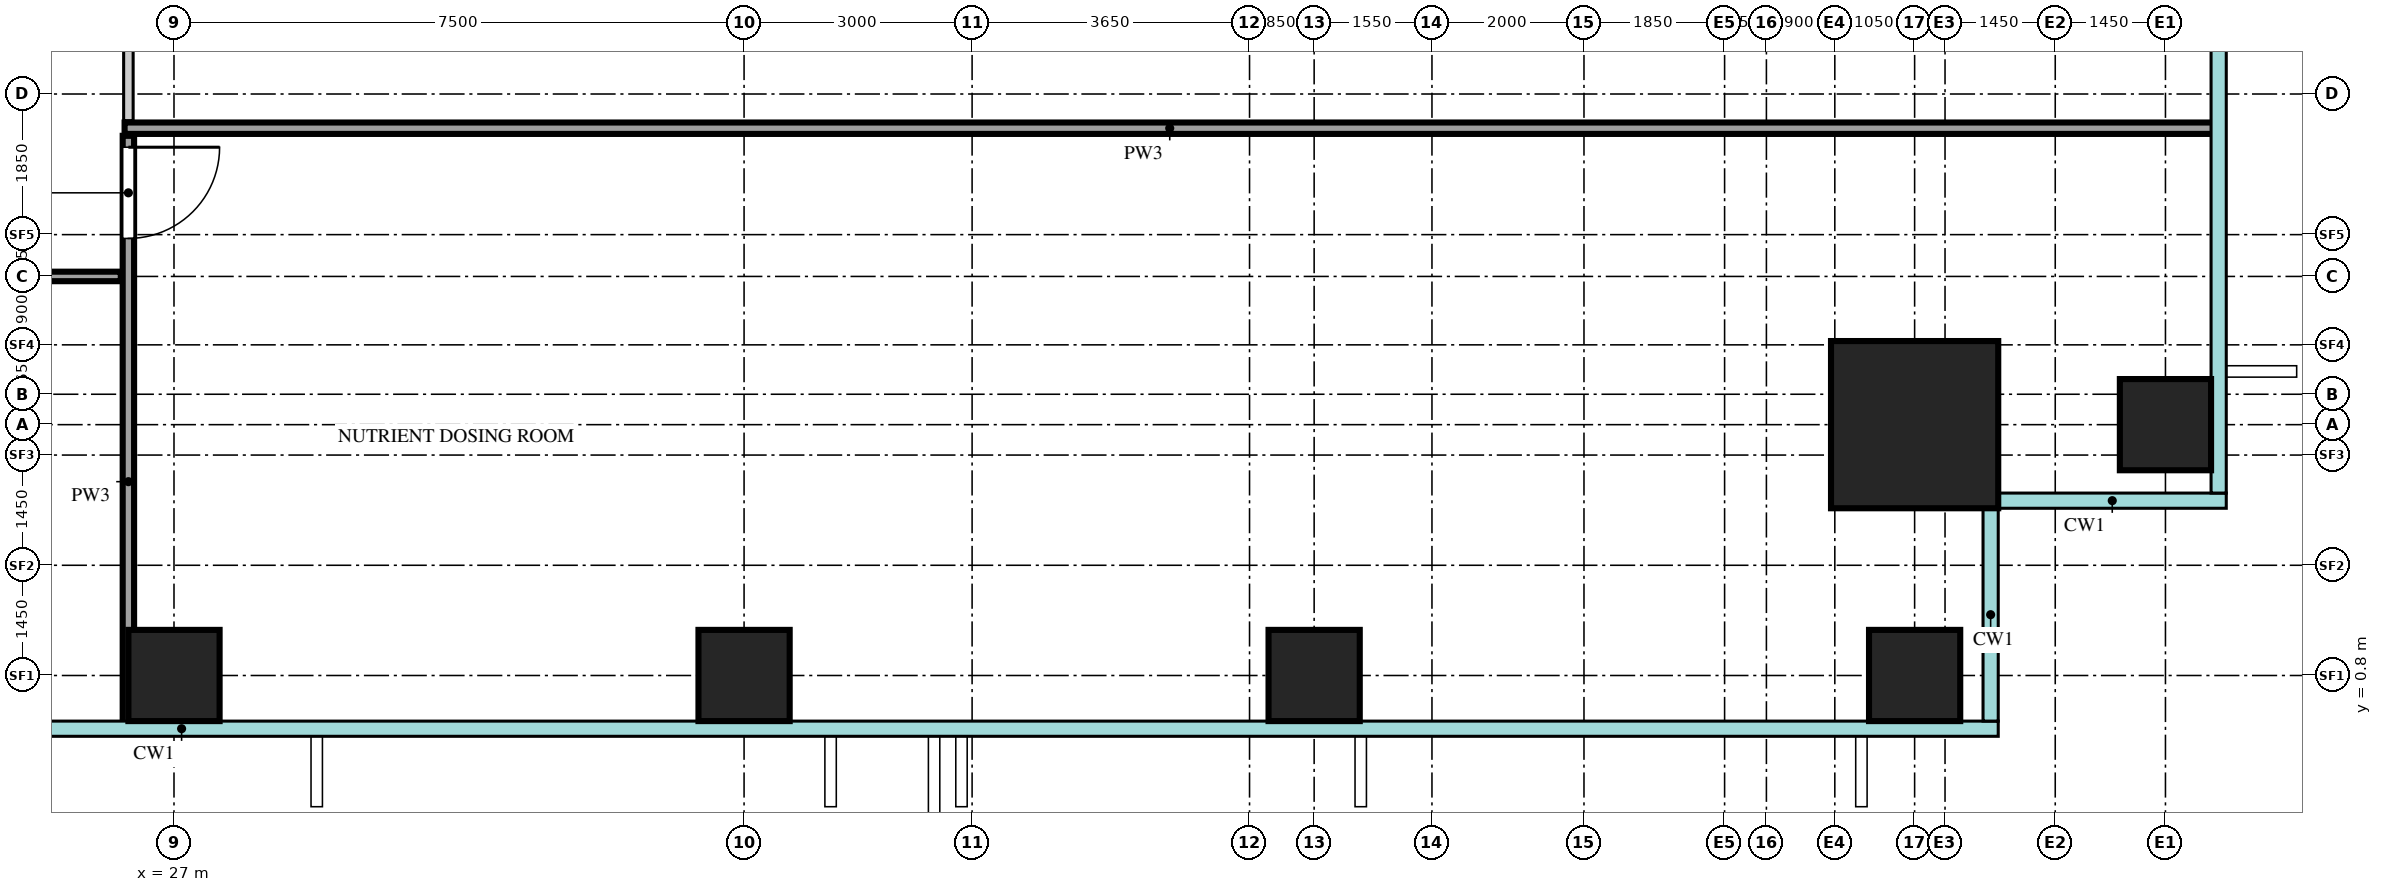
"""IFC4 building model, lengths in metres.
Left out: names, types, materials, properties, quantities, classifications, styles, units other than length and angle.
Written with IfcOpenShell. Run it as: python <this file> out.ifc"""

import sys

from ifc_helpers import new_model, si_unit, direction, frame, frame_2d, origin, origin_2d, place, context, subcontext, project, spatial, rectangle, extrude, source, transform, mapped, element, fill, save


model = new_model("IFC4")
c1 = context("Model", 3, precision=1e-05, world=origin(), true_north=direction((0.0, 1.0)))
c2 = subcontext(c1, "Body", "Model", "MODEL_VIEW")
j1 = project(units=[si_unit("LENGTHUNIT", "METRE"), si_unit("PLANEANGLEUNIT", "RADIAN")], contexts=[c1])
p1 = place(None, origin())
s1 = spatial("IfcSite", under=j1, at=p1, CompositionType="ELEMENT")
p2 = place(p1, origin())
s2 = spatial("IfcBuilding", under=s1, at=p2, CompositionType="ELEMENT")
p3 = place(p2, frame((0.0, 0.0, 33.0)))
s3 = spatial("IfcBuildingStorey", under=s2, at=p3, CompositionType="ELEMENT", Elevation=33.0)
m1 = source(origin(), c2, "Body", "SweptSolid", [
    extrude(rectangle(XDim=2.2, YDim=2.2, at=origin_2d()), origin(), (0.0, 0.0, 1.0), 4.5),
])
p4 = place(p3, frame((49.9, 4.1, 0.0), z_axis=(0.0, 0.0, 1.0), x_axis=(1.0, 0.0, 0.0)))
e1 = element("IfcColumn", 1, at=p4, inside=s3, PredefinedType="COLUMN", context=c2, shape_type="MappedRepresentation", body=[
    mapped(m1, transform((0.0, 0.0, 0.0))),
])
m2 = source(origin(), c2, "Body", "SweptSolid", [
    extrude(rectangle(XDim=1.2, YDim=1.2, at=origin_2d()), origin(), (0.0, 0.0, 1.0), 4.2),
])
for number, where, z_axis, x_axis in (
    (2, (27.0, 0.8, 0.0), (0.0, 0.0, 1.0), (1.0, 0.0, 0.0)),
    (3, (34.5, 0.8, 0.0), (0.0, 0.0, 1.0), (1.0, 0.0, 0.0)),
    (4, (42.0, 0.8, 0.0), (0.0, 0.0, 1.0), (1.0, 0.0, 0.0)),
    (5, (49.9, 0.8, 0.0), (0.0, 0.0, 1.0), (1.0, 0.0, 0.0)),
    (6, (53.2, 4.1, 0.0), (0.0, 0.0, 1.0), (1.0, 0.0, 0.0)),
):
    element("IfcColumn", number, at=place(p3, frame(where, z_axis=z_axis, x_axis=x_axis)), inside=s3, PredefinedType="COLUMN", context=c2, shape_type="MappedRepresentation", body=[
        mapped(m2, transform((0.0, 0.0, 0.0))),
    ])
m3 = source(origin(), c2, "Body", "SweptSolid", [
    extrude(rectangle(XDim=7.75, YDim=0.15, at=frame_2d((3.875, 0.0))), origin(), (0.0, 0.0, 1.0), 4.3),
])
p5 = place(p3, frame((26.4, 0.15, 0.0), z_axis=(0.0, 0.0, 1.0), x_axis=(0.0, 1.0, 0.0)))
e7 = element("IfcWall", 7, at=p5, inside=s3, PredefinedType="PARTITIONING", context=c2, shape_type="MappedRepresentation", body=[
    mapped(m3, transform((0.0, 0.0, 0.0))),
])
m4 = source(origin(), c2, "Body", "SweptSolid", [
    extrude(rectangle(XDim=1.2, YDim=2.1, at=frame_2d((0.6, 1.05))), frame((0.0, 0.085, 0.0), z_axis=(0.0, -1.0, 0.0), x_axis=(1.0, 0.0, 0.0)), (0.0, 0.0, 1.0), 0.17),
])
p6 = place(p5, frame((6.4, 0.0, 0.0)))
e8 = element("IfcOpeningElement", 8, at=p6, cuts=e7, PredefinedType="OPENING", context=c2, shape_type="MappedRepresentation", body=[
    mapped(m4, transform((0.0, 0.0, 0.0))),
])
m5 = source(origin(), c2, "Body", "SweptSolid", [
    extrude(rectangle(XDim=22.15, YDim=0.125, at=frame_2d((11.075, 0.0))), origin(), (0.0, 0.0, 1.0), 4.3),
])
p7 = place(p3, frame((4.15, 6.05, 0.0), z_axis=(0.0, 0.0, 1.0), x_axis=(1.0, 0.0, 0.0)))
e9 = element("IfcWall", 9, at=p7, inside=s3, PredefinedType="PARTITIONING", context=c2, shape_type="MappedRepresentation", body=[
    mapped(m5, transform((0.0, 0.0, 0.0))),
])
m6 = source(origin(), c2, "Body", "SweptSolid", [
    extrude(rectangle(XDim=0.9, YDim=2.1, at=frame_2d((0.45, 1.05))), frame((0.0, 0.073, 0.0), z_axis=(0.0, -1.0, 0.0), x_axis=(1.0, 0.0, 0.0)), (0.0, 0.0, 1.0), 0.145),
])
p8 = place(p7, frame((3.5, 0.0, 0.0)))
e10 = element("IfcOpeningElement", 10, at=p8, cuts=e9, PredefinedType="OPENING", context=c2, shape_type="MappedRepresentation", body=[
    mapped(m6, transform((0.0, 0.0, 0.0))),
])
m7 = source(origin(), c2, "Body", "SweptSolid", [
    extrude(rectangle(XDim=1.2, YDim=2.1, at=frame_2d((0.6, 1.05))), frame((0.0, 0.073, 0.0), z_axis=(0.0, -1.0, 0.0), x_axis=(1.0, 0.0, 0.0)), (0.0, 0.0, 1.0), 0.145),
])
p9 = place(p7, frame((13.25, 0.0, 0.0)))
e11 = element("IfcOpeningElement", 11, at=p9, cuts=e9, PredefinedType="OPENING", context=c2, shape_type="MappedRepresentation", body=[
    mapped(m7, transform((0.0, 0.0, 0.0))),
])
m8 = source(origin(), c2, "Body", "SweptSolid", [
    extrude(rectangle(XDim=27.5, YDim=0.15, at=frame_2d((13.75, 0.0))), origin(), (0.0, 0.0, 1.0), 4.3),
])
p10 = place(p3, frame((26.35, 8.0, 0.0), z_axis=(0.0, 0.0, 1.0), x_axis=(1.0, 0.0, 0.0)))
e12 = element("IfcWall", 12, at=p10, inside=s3, PredefinedType="PARTITIONING", context=c2, shape_type="MappedRepresentation", body=[
    mapped(m8, transform((0.0, 0.0, 0.0))),
])
m9 = source(origin(), c2, "Body", "SweptSolid", [
    extrude(rectangle(XDim=27.1, YDim=0.125, at=frame_2d((13.55, 0.0))), origin(), (0.0, 0.0, 1.0), 4.3),
])
p11 = place(p3, frame((26.4, 8.1, 0.0), z_axis=(0.0, 0.0, 1.0), x_axis=(0.0, 1.0, 0.0)))
e13 = element("IfcWall", 13, at=p11, inside=s3, PredefinedType="PARTITIONING", context=c2, shape_type="MappedRepresentation", body=[
    mapped(m9, transform((0.0, 0.0, 0.0))),
])
p12 = place(p11, frame((3.8, 0.0, 0.0)))
e14 = element("IfcOpeningElement", 14, at=p12, cuts=e13, PredefinedType="OPENING", context=c2, shape_type="MappedRepresentation", body=[
    mapped(m7, transform((0.0, 0.0, 0.0))),
])
p13 = place(p11, frame((12.8, 0.0, 0.0)))
e15 = element("IfcOpeningElement", 15, at=p13, cuts=e13, PredefinedType="OPENING", context=c2, shape_type="MappedRepresentation", body=[
    mapped(m7, transform((0.0, 0.0, 0.0))),
])
m10 = source(origin(), c2, "Body", "SweptSolid", [
    extrude(rectangle(XDim=1.2, YDim=2.1, at=frame_2d((0.6, 1.05))), frame((0.0, 0.025, 0.0), z_axis=(0.0, -1.0, 0.0), x_axis=(1.0, 0.0, 0.0)), (0.0, 0.0, 1.0), 0.05),
])
p14 = place(p6, origin())
e16 = element("IfcDoor", 16, at=p14, inside=s3, OperationType="SINGLE_SWING_RIGHT", PredefinedType="DOOR", context=c2, shape_type="MappedRepresentation", body=[
    mapped(m10, transform((0.0, 0.0, 0.0))),
])
fill(e8, e16)
save(model, sys.argv[1])
